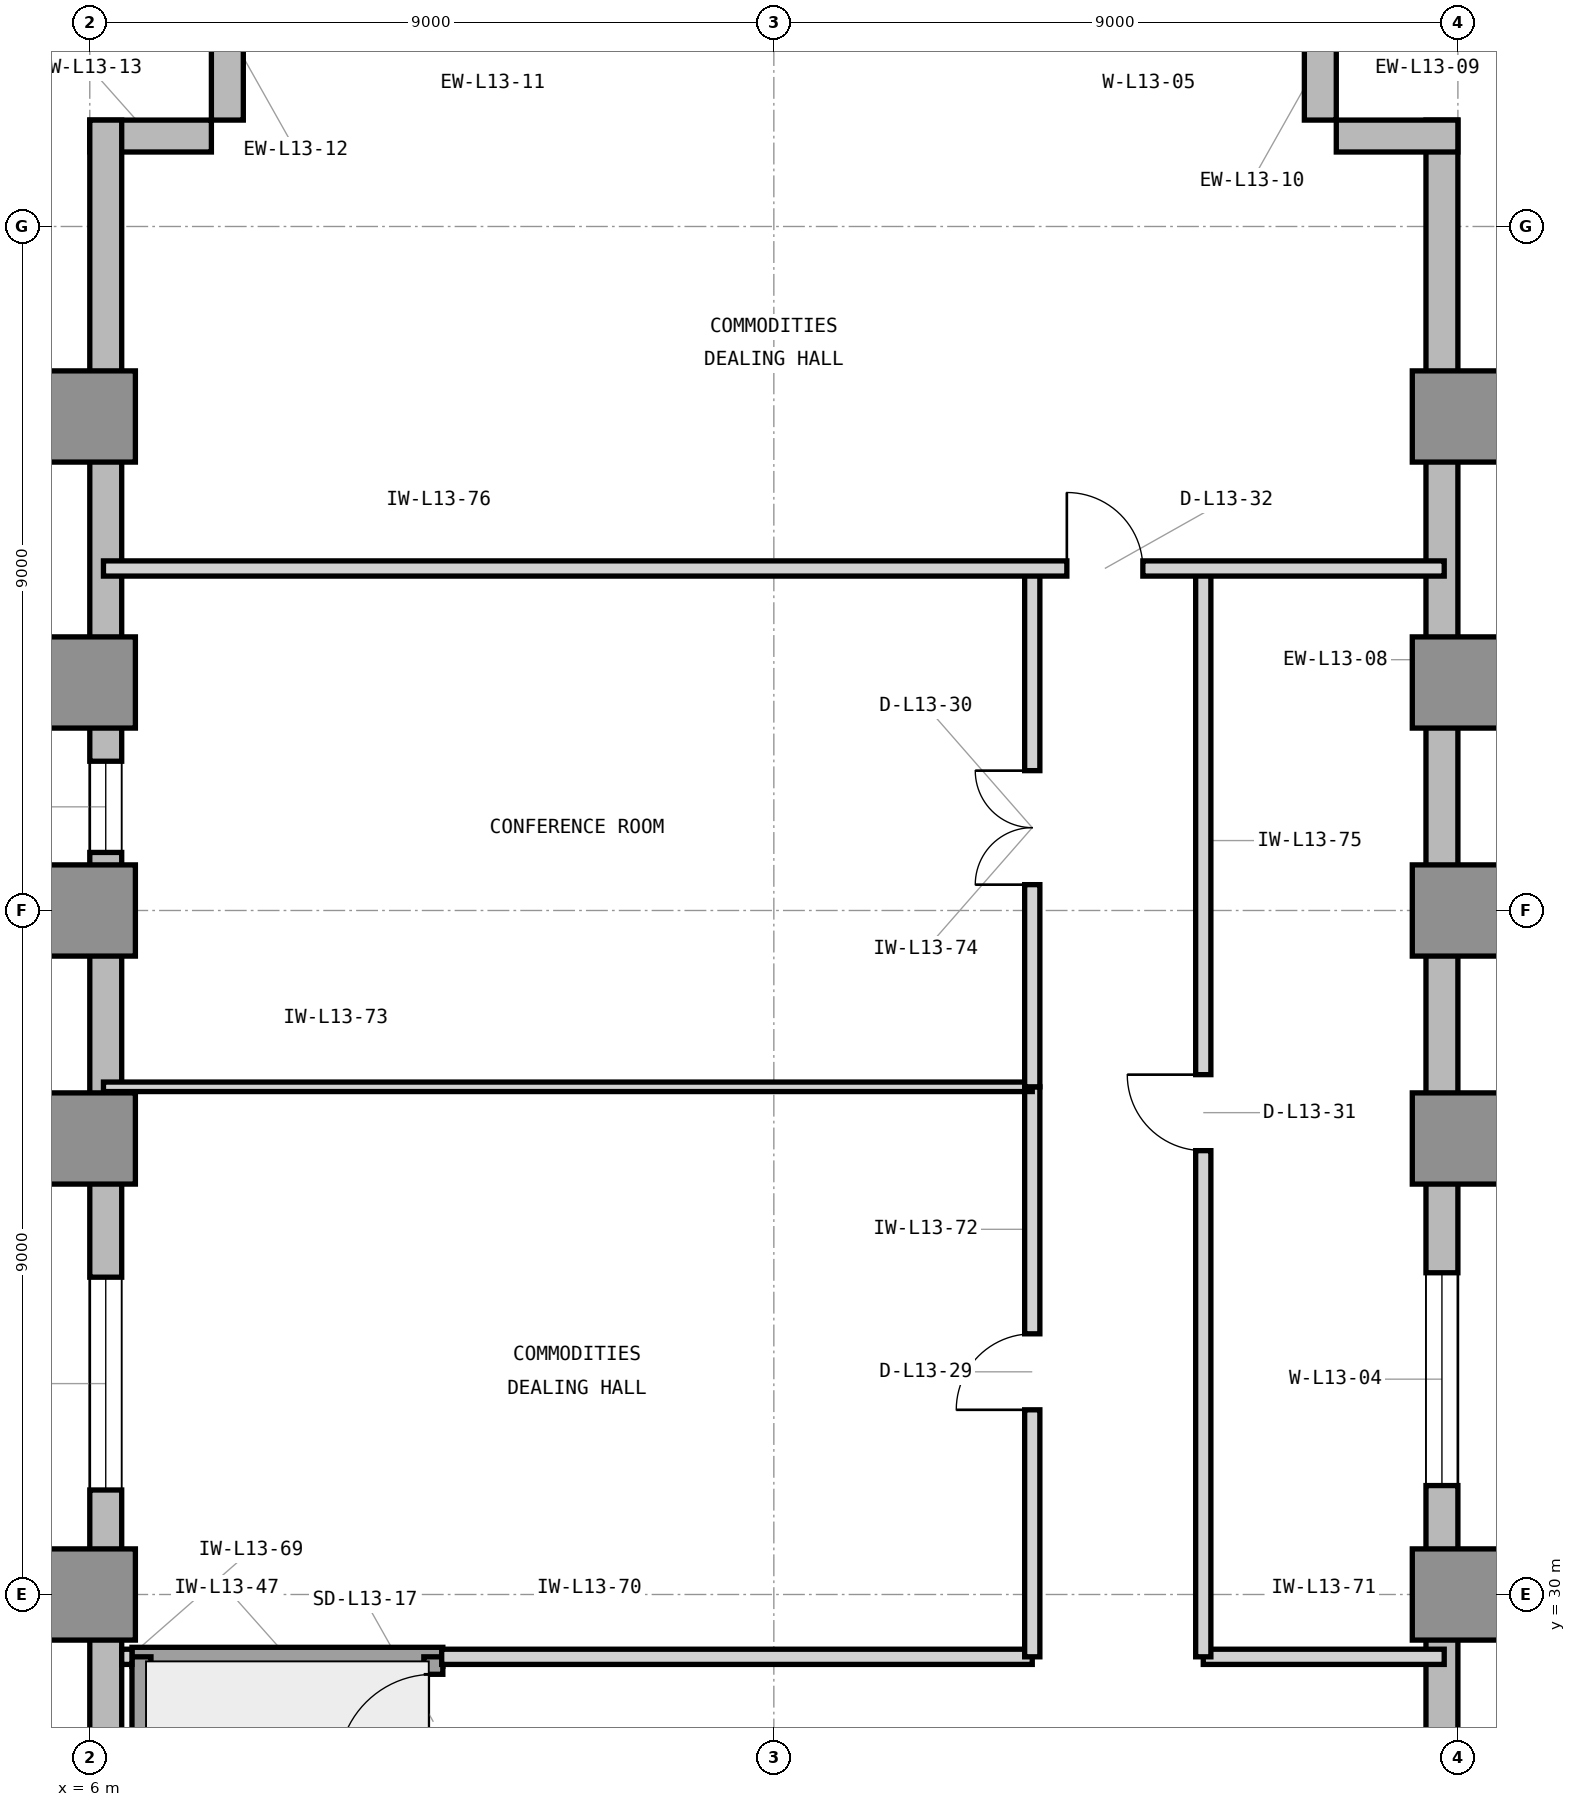
"""IFC4 building model, lengths in metres.
Left out: names, types, materials, properties, quantities, classifications, styles, units other than length and angle.
Written with IfcOpenShell. Run it as: python <this file> out.ifc"""

import sys

from ifc_helpers import new_model, si_unit, direction, frame, frame_2d, origin, origin_2d, place, context, subcontext, project, spatial, rectangle, extrude, element, fill, save


model = new_model("IFC4")
c1 = context("Model", 3, precision=1e-05, world=origin(), true_north=direction((0.0, 1.0)))
c2 = subcontext(c1, "Body", "Model", "MODEL_VIEW")
j1 = project(units=[si_unit("LENGTHUNIT", "METRE"), si_unit("PLANEANGLEUNIT", "RADIAN")], contexts=[c1])
p1 = place(None, origin())
s1 = spatial("IfcSite", under=j1, at=p1, CompositionType="ELEMENT")
p2 = place(p1, origin())
s2 = spatial("IfcBuilding", under=s1, at=p2, CompositionType="ELEMENT")
p3 = place(p2, frame((0.0, 0.0, 59.4)))
s3 = spatial("IfcBuildingStorey", under=s2, at=p3, CompositionType="ELEMENT", Elevation=59.4)
for number, where, z_axis, x_axis in (
    (1, (6.0, 30.0, 0.0), (0.0, 0.0, 1.0), (1.0, 0.0, 0.0)),
    (2, (24.0, 30.0, 0.0), (0.0, 0.0, 1.0), (1.0, 0.0, 0.0)),
    (3, (6.0, 36.0, 0.0), (0.0, 0.0, 1.0), (1.0, 0.0, 0.0)),
    (4, (24.0, 36.0, 0.0), (0.0, 0.0, 1.0), (1.0, 0.0, 0.0)),
    (5, (6.0, 39.0, 0.0), (0.0, 0.0, 1.0), (1.0, 0.0, 0.0)),
    (6, (24.0, 39.0, 0.0), (0.0, 0.0, 1.0), (1.0, 0.0, 0.0)),
    (7, (6.0, 42.0, 0.0), (0.0, 0.0, 1.0), (1.0, 0.0, 0.0)),
    (8, (24.0, 42.0, 0.0), (0.0, 0.0, 1.0), (1.0, 0.0, 0.0)),
    (9, (6.0, 45.5, 0.0), (0.0, 0.0, 1.0), (1.0, 0.0, 0.0)),
    (10, (24.0, 45.5, 0.0), (0.0, 0.0, 1.0), (1.0, 0.0, 0.0)),
):
    element("IfcColumn", number, at=place(p3, frame(where, z_axis=z_axis, x_axis=x_axis)), inside=s3, PredefinedType="COLUMN", context=c2, shape_type="SweptSolid", body=[
        extrude(rectangle(XDim=1.2, YDim=1.2, at=origin_2d()), origin(), (0.0, 0.0, 1.0), 4.2),
    ])
p4 = place(p3, frame((23.79, 21.0, 0.0), z_axis=(0.0, 0.0, 1.0), x_axis=(0.0, 1.0, 0.0)))
e11 = element("IfcWall", 11, at=p4, inside=s3, PredefinedType="STANDARD", context=c2, shape_type="SweptSolid", body=[
    extrude(rectangle(XDim=28.4, YDim=0.42, at=frame_2d((14.2, 0.0))), origin(), (0.0, 0.0, 1.0), 3.98),
])
p5 = place(p4, frame((10.433, 0.0, 0.85)))
e12 = element("IfcOpeningElement", 12, at=p5, cuts=e11, PredefinedType="OPENING", context=c2, shape_type="SweptSolid", body=[
    extrude(rectangle(XDim=2.8, YDim=2.45, at=frame_2d((1.4, 1.225))), frame((0.0, 0.22, 0.0), z_axis=(0.0, -1.0, 0.0), x_axis=(1.0, 0.0, 0.0)), (0.0, 0.0, 1.0), 0.44),
])
for number, where, z_axis, x_axis in (
    (13, (24.0, 49.19, 0.0), (0.0, 0.0, 1.0), (-1.0, 0.0, 0.0)),
    (14, (22.19, 49.4, 0.0), (0.0, 0.0, 1.0), (0.0, 1.0, 0.0)),
    (15, (7.81, 51.0, 0.0), (0.0, 0.0, 1.0), (0.0, -1.0, 0.0)),
    (16, (7.6, 49.19, 0.0), (0.0, 0.0, 1.0), (-1.0, 0.0, 0.0)),
):
    element("IfcWall", number, at=place(p3, frame(where, z_axis=z_axis, x_axis=x_axis)), inside=s3, PredefinedType="STANDARD", context=c2, shape_type="SweptSolid", body=[
        extrude(rectangle(XDim=1.6, YDim=0.42, at=frame_2d((0.8, 0.0))), origin(), (0.0, 0.0, 1.0), 3.98),
    ])
p6 = place(p3, frame((6.21, 49.4, 0.0), z_axis=(0.0, 0.0, 1.0), x_axis=(0.0, -1.0, 0.0)))
e17 = element("IfcWall", 17, at=p6, inside=s3, PredefinedType="STANDARD", context=c2, shape_type="SweptSolid", body=[
    extrude(rectangle(XDim=28.5, YDim=0.42, at=frame_2d((14.25, 0.0))), origin(), (0.0, 0.0, 1.0), 3.98),
])
p7 = place(p6, frame((15.225, 0.0, 0.85)))
e18 = element("IfcOpeningElement", 18, at=p7, cuts=e17, PredefinedType="OPENING", context=c2, shape_type="SweptSolid", body=[
    extrude(rectangle(XDim=2.8, YDim=2.45, at=frame_2d((1.4, 1.225))), frame((0.0, 0.22, 0.0), z_axis=(0.0, -1.0, 0.0), x_axis=(1.0, 0.0, 0.0)), (0.0, 0.0, 1.0), 0.44),
])
p8 = place(p6, frame((8.436, 0.0, 0.85)))
e19 = element("IfcOpeningElement", 19, at=p8, cuts=e17, PredefinedType="OPENING", context=c2, shape_type="SweptSolid", body=[
    extrude(rectangle(XDim=1.2, YDim=2.45, at=frame_2d((0.6, 1.225))), frame((0.0, 0.22, 0.0), z_axis=(0.0, -1.0, 0.0), x_axis=(1.0, 0.0, 0.0)), (0.0, 0.0, 1.0), 0.44),
])
p9 = place(p3, frame((6.555, 29.18, 0.0), z_axis=(0.0, 0.0, 1.0), x_axis=(1.0, 0.0, 0.0)))
e20 = element("IfcWall", 20, at=p9, inside=s3, PredefinedType="SHEAR", context=c2, shape_type="SweptSolid", body=[
    extrude(rectangle(XDim=4.09, YDim=0.25, at=frame_2d((2.045, 0.0))), origin(), (0.0, 0.0, 1.0), 4.2),
])
p10 = place(p3, frame((6.68, 21.68, 0.0), z_axis=(0.0, 0.0, 1.0), x_axis=(0.0, 1.0, 0.0)))
e21 = element("IfcWall", 21, at=p10, inside=s3, PredefinedType="SHEAR", context=c2, shape_type="SweptSolid", body=[
    extrude(rectangle(XDim=7.5, YDim=0.25, at=frame_2d((3.75, 0.0))), origin(), (0.0, 0.0, 1.0), 4.2),
])
p11 = place(p3, frame((10.52, 21.68, 0.0), z_axis=(0.0, 0.0, 1.0), x_axis=(0.0, 1.0, 0.0)))
e22 = element("IfcWall", 22, at=p11, inside=s3, PredefinedType="SHEAR", context=c2, shape_type="SweptSolid", body=[
    extrude(rectangle(XDim=7.5, YDim=0.25, at=frame_2d((3.75, 0.0))), origin(), (0.0, 0.0, 1.0), 4.2),
])
p12 = place(p11, frame((6.02, 0.0, 0.0)))
e23 = element("IfcOpeningElement", 23, at=p12, cuts=e22, PredefinedType="OPENING", context=c2, shape_type="SweptSolid", body=[
    extrude(rectangle(XDim=1.25, YDim=2.2, at=frame_2d((0.625, 1.1))), frame((0.0, 0.135, 0.0), z_axis=(0.0, -1.0, 0.0), x_axis=(1.0, 0.0, 0.0)), (0.0, 0.0, 1.0), 0.27),
])
p13 = place(p3, frame((6.42, 29.18, 0.0), z_axis=(0.0, 0.0, 1.0), x_axis=(1.0, 0.0, 0.0)))
e24 = element("IfcWall", 24, at=p13, inside=s3, PredefinedType="PARTITIONING", context=c2, shape_type="SweptSolid", body=[
    extrude(rectangle(XDim=0.135, YDim=0.2, at=frame_2d((0.067, 0.0))), origin(), (0.0, 0.0, 1.0), 3.97),
])
p14 = place(p3, frame((10.63, 29.18, 0.0), z_axis=(0.0, 0.0, 1.0), x_axis=(1.0, 0.0, 0.0)))
e25 = element("IfcWall", 25, at=p14, inside=s3, PredefinedType="PARTITIONING", context=c2, shape_type="SweptSolid", body=[
    extrude(rectangle(XDim=7.77, YDim=0.2, at=frame_2d((3.885, 0.0))), origin(), (0.0, 0.0, 1.0), 3.97),
])
p15 = place(p3, frame((20.65, 29.18, 0.0), z_axis=(0.0, 0.0, 1.0), x_axis=(1.0, 0.0, 0.0)))
e26 = element("IfcWall", 26, at=p15, inside=s3, PredefinedType="PARTITIONING", context=c2, shape_type="SweptSolid", body=[
    extrude(rectangle(XDim=3.17, YDim=0.2, at=frame_2d((1.585, 0.0))), origin(), (0.0, 0.0, 1.0), 3.97),
])
p16 = place(p3, frame((18.4, 29.18, 0.0), z_axis=(0.0, 0.0, 1.0), x_axis=(0.0, 1.0, 0.0)))
e27 = element("IfcWall", 27, at=p16, inside=s3, PredefinedType="PARTITIONING", context=c2, shape_type="SweptSolid", body=[
    extrude(rectangle(XDim=7.5, YDim=0.2, at=frame_2d((3.75, 0.0))), origin(), (0.0, 0.0, 1.0), 3.97),
])
p17 = place(p16, frame((3.25, 0.0, 0.0)))
e28 = element("IfcOpeningElement", 28, at=p17, cuts=e27, PredefinedType="OPENING", context=c2, shape_type="SweptSolid", body=[
    extrude(rectangle(XDim=1.0, YDim=2.15, at=frame_2d((0.5, 1.075))), frame((0.0, 0.11, 0.0), z_axis=(0.0, -1.0, 0.0), x_axis=(1.0, 0.0, 0.0)), (0.0, 0.0, 1.0), 0.22),
])
p18 = place(p3, frame((6.18, 36.68, 0.0), z_axis=(0.0, 0.0, 1.0), x_axis=(1.0, 0.0, 0.0)))
e29 = element("IfcWall", 29, at=p18, inside=s3, PredefinedType="PARTITIONING", context=c2, shape_type="SweptSolid", body=[
    extrude(rectangle(XDim=12.22, YDim=0.125, at=frame_2d((6.11, 0.0))), origin(), (0.0, 0.0, 1.0), 3.97),
])
p19 = place(p3, frame((18.4, 36.68, 0.0), z_axis=(0.0, 0.0, 1.0), x_axis=(0.0, 1.0, 0.0)))
e30 = element("IfcWall", 30, at=p19, inside=s3, PredefinedType="PARTITIONING", context=c2, shape_type="SweptSolid", body=[
    extrude(rectangle(XDim=6.82, YDim=0.2, at=frame_2d((3.41, 0.0))), origin(), (0.0, 0.0, 1.0), 3.97),
])
p20 = place(p19, frame((2.66, 0.0, 0.0)))
e31 = element("IfcOpeningElement", 31, at=p20, cuts=e30, PredefinedType="OPENING", context=c2, shape_type="SweptSolid", body=[
    extrude(rectangle(XDim=1.5, YDim=2.3, at=frame_2d((0.75, 1.15))), frame((0.0, 0.11, 0.0), z_axis=(0.0, -1.0, 0.0), x_axis=(1.0, 0.0, 0.0)), (0.0, 0.0, 1.0), 0.22),
])
p21 = place(p3, frame((20.65, 29.18, 0.0), z_axis=(0.0, 0.0, 1.0), x_axis=(0.0, 1.0, 0.0)))
e32 = element("IfcWall", 32, at=p21, inside=s3, PredefinedType="PARTITIONING", context=c2, shape_type="SweptSolid", body=[
    extrude(rectangle(XDim=14.32, YDim=0.2, at=frame_2d((7.16, 0.0))), origin(), (0.0, 0.0, 1.0), 3.97),
])
p22 = place(p21, frame((6.66, 0.0, 0.0)))
e33 = element("IfcOpeningElement", 33, at=p22, cuts=e32, PredefinedType="OPENING", context=c2, shape_type="SweptSolid", body=[
    extrude(rectangle(XDim=1.0, YDim=2.15, at=frame_2d((0.5, 1.075))), frame((0.0, 0.11, 0.0), z_axis=(0.0, -1.0, 0.0), x_axis=(1.0, 0.0, 0.0)), (0.0, 0.0, 1.0), 0.22),
])
p23 = place(p3, frame((6.18, 43.5, 0.0), z_axis=(0.0, 0.0, 1.0), x_axis=(1.0, 0.0, 0.0)))
e34 = element("IfcWall", 34, at=p23, inside=s3, PredefinedType="PARTITIONING", context=c2, shape_type="SweptSolid", body=[
    extrude(rectangle(XDim=17.64, YDim=0.2, at=frame_2d((8.82, 0.0))), origin(), (0.0, 0.0, 1.0), 3.97),
])
p24 = place(p23, frame((12.675, 0.0, 0.0)))
e35 = element("IfcOpeningElement", 35, at=p24, cuts=e34, PredefinedType="OPENING", context=c2, shape_type="SweptSolid", body=[
    extrude(rectangle(XDim=1.0, YDim=2.15, at=frame_2d((0.5, 1.075))), frame((0.0, 0.11, 0.0), z_axis=(0.0, -1.0, 0.0), x_axis=(1.0, 0.0, 0.0)), (0.0, 0.0, 1.0), 0.22),
])
p25 = place(p5, origin())
e36 = element("IfcWindow", 36, at=p25, inside=s3, PartitioningType="SINGLE_PANEL", PredefinedType="WINDOW", context=c2, shape_type="SweptSolid", body=[
    extrude(rectangle(XDim=2.8, YDim=2.45, at=frame_2d((1.4, 1.225))), frame((0.0, 0.11, 0.0), z_axis=(0.0, -1.0, 0.0), x_axis=(1.0, 0.0, 0.0)), (0.0, 0.0, 1.0), 0.06),
])
fill(e12, e36)
p26 = place(p7, origin())
e37 = element("IfcWindow", 37, at=p26, inside=s3, PartitioningType="SINGLE_PANEL", PredefinedType="WINDOW", context=c2, shape_type="SweptSolid", body=[
    extrude(rectangle(XDim=2.8, YDim=2.45, at=frame_2d((1.4, 1.225))), frame((0.0, 0.11, 0.0), z_axis=(0.0, -1.0, 0.0), x_axis=(1.0, 0.0, 0.0)), (0.0, 0.0, 1.0), 0.06),
])
fill(e18, e37)
p27 = place(p12, origin())
e38 = element("IfcDoor", 38, at=p27, inside=s3, OperationType="SINGLE_SWING_LEFT", PredefinedType="DOOR", context=c2, shape_type="SweptSolid", body=[
    extrude(rectangle(XDim=1.25, YDim=2.2, at=frame_2d((0.625, 1.1))), frame((0.0, 0.025, 0.0), z_axis=(0.0, -1.0, 0.0), x_axis=(1.0, 0.0, 0.0)), (0.0, 0.0, 1.0), 0.05),
])
fill(e23, e38)
p28 = place(p17, origin())
e39 = element("IfcDoor", 39, at=p28, inside=s3, OperationType="SINGLE_SWING_LEFT", PredefinedType="DOOR", context=c2, shape_type="SweptSolid", body=[
    extrude(rectangle(XDim=1.0, YDim=2.15, at=frame_2d((0.5, 1.075))), frame((0.0, 0.025, 0.0), z_axis=(0.0, -1.0, 0.0), x_axis=(1.0, 0.0, 0.0)), (0.0, 0.0, 1.0), 0.05),
])
fill(e28, e39)
p29 = place(p20, origin())
e40 = element("IfcDoor", 40, at=p29, inside=s3, OperationType="DOUBLE_DOOR_SINGLE_SWING", PredefinedType="DOOR", context=c2, shape_type="SweptSolid", body=[
    extrude(rectangle(XDim=1.5, YDim=2.3, at=frame_2d((0.75, 1.15))), frame((0.0, 0.025, 0.0), z_axis=(0.0, -1.0, 0.0), x_axis=(1.0, 0.0, 0.0)), (0.0, 0.0, 1.0), 0.05),
])
fill(e31, e40)
p30 = place(p22, origin())
e41 = element("IfcDoor", 41, at=p30, inside=s3, OperationType="SINGLE_SWING_RIGHT", PredefinedType="DOOR", context=c2, shape_type="SweptSolid", body=[
    extrude(rectangle(XDim=1.0, YDim=2.15, at=frame_2d((0.5, 1.075))), frame((0.0, 0.025, 0.0), z_axis=(0.0, -1.0, 0.0), x_axis=(1.0, 0.0, 0.0)), (0.0, 0.0, 1.0), 0.05),
])
fill(e33, e41)
p31 = place(p24, origin())
e42 = element("IfcDoor", 42, at=p31, inside=s3, OperationType="SINGLE_SWING_LEFT", PredefinedType="DOOR", context=c2, shape_type="SweptSolid", body=[
    extrude(rectangle(XDim=1.0, YDim=2.15, at=frame_2d((0.5, 1.075))), frame((0.0, 0.025, 0.0), z_axis=(0.0, -1.0, 0.0), x_axis=(1.0, 0.0, 0.0)), (0.0, 0.0, 1.0), 0.05),
])
fill(e35, e42)
p32 = place(p8, origin())
e43 = element("IfcWindow", 43, at=p32, inside=s3, PartitioningType="SINGLE_PANEL", PredefinedType="WINDOW", context=c2, shape_type="SweptSolid", body=[
    extrude(rectangle(XDim=1.2, YDim=2.45, at=frame_2d((0.6, 1.225))), frame((0.0, 0.11, 0.0), z_axis=(0.0, -1.0, 0.0), x_axis=(1.0, 0.0, 0.0)), (0.0, 0.0, 1.0), 0.06),
])
fill(e19, e43)
save(model, sys.argv[1])
